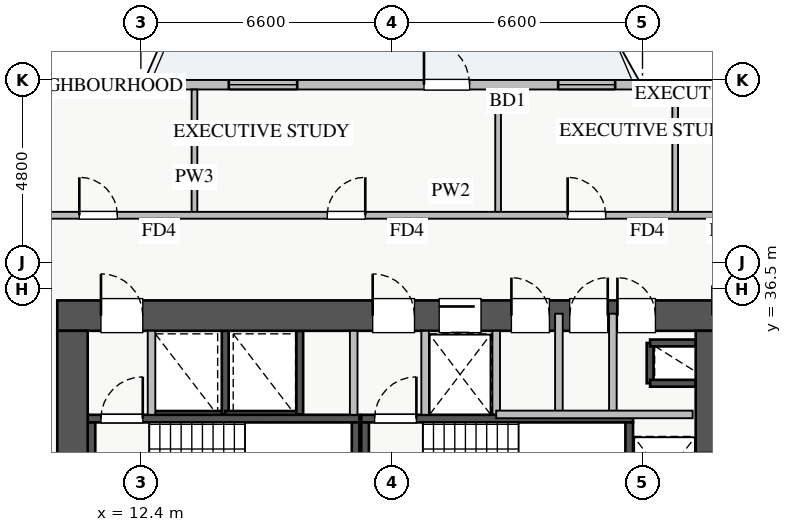
"""IFC4 building model, lengths in metres.
Left out: names, types, materials, properties, quantities, classifications, styles, units other than length and angle.
Written with IfcOpenShell. Run it as: python <this file> out.ifc"""

import sys

from ifc_helpers import new_model, si_unit, direction, frame, frame_2d, origin, place, context, subcontext, project, spatial, rectangle, extrude, source, transform, mapped, element, fill, save


model = new_model("IFC4")
c1 = context("Model", 3, precision=1e-05, world=origin(), true_north=direction((0.0, 1.0)))
c2 = subcontext(c1, "Body", "Model", "MODEL_VIEW")
j1 = project(units=[si_unit("LENGTHUNIT", "METRE"), si_unit("PLANEANGLEUNIT", "RADIAN")], contexts=[c1])
p1 = place(None, origin())
s1 = spatial("IfcSite", under=j1, at=p1, CompositionType="ELEMENT")
p2 = place(p1, origin())
s2 = spatial("IfcBuilding", under=s1, at=p2, CompositionType="ELEMENT")
p3 = place(p2, frame((0.0, 0.0, 63.25)))
s3 = spatial("IfcBuildingStorey", under=s2, at=p3, CompositionType="ELEMENT", Elevation=63.25)
p4 = place(p3, frame((12.68, 33.2, 0.0), z_axis=(0.0, 0.0, 1.0), x_axis=(1.0, 0.0, 0.0)))
e1 = element("IfcWall", 1, at=p4, inside=s3, PredefinedType="SHEAR", context=c2, shape_type="SweptSolid", body=[
    extrude(rectangle(XDim=1.94, YDim=0.18, at=frame_2d((0.97, 0.0))), origin(), (0.0, 0.0, 1.0), 3.07),
])
p5 = place(p3, frame((14.62, 33.2, 0.0), z_axis=(0.0, 0.0, 1.0), x_axis=(0.0, 1.0, 0.0)))
e2 = element("IfcWall", 2, at=p5, inside=s3, PredefinedType="SHEAR", context=c2, shape_type="SweptSolid", body=[
    extrude(rectangle(XDim=2.2, YDim=0.18, at=frame_2d((1.1, 0.0))), origin(), (0.0, 0.0, 1.0), 3.07),
])
p6 = place(p3, frame((25.8, 34.02, 0.0), z_axis=(0.0, 0.0, 1.0), x_axis=(0.0, 1.0, 0.0)))
e3 = element("IfcWall", 3, at=p6, inside=s3, PredefinedType="SHEAR", context=c2, shape_type="SweptSolid", body=[
    extrude(rectangle(XDim=1.06, YDim=0.18, at=frame_2d((0.53, 0.0))), origin(), (0.0, 0.0, 1.0), 3.07),
])
for number, where, z_axis, x_axis in (
    (4, (25.8, 35.08, 0.0), (0.0, 0.0, 1.0), (1.0, 0.0, 0.0)),
    (5, (25.8, 34.02, 0.0), (0.0, 0.0, 1.0), (1.0, 0.0, 0.0)),
):
    element("IfcWall", number, at=place(p3, frame(where, z_axis=z_axis, x_axis=x_axis)), inside=s3, PredefinedType="SHEAR", context=c2, shape_type="SweptSolid", body=[
        extrude(rectangle(XDim=1.2, YDim=0.18, at=frame_2d((0.6, 0.0))), origin(), (0.0, 0.0, 1.0), 3.07),
    ])
p7 = place(p3, frame((14.62, 33.2, 0.0), z_axis=(0.0, 0.0, 1.0), x_axis=(1.0, 0.0, 0.0)))
e6 = element("IfcWall", 6, at=p7, inside=s3, PredefinedType="SHEAR", context=c2, shape_type="SweptSolid", body=[
    extrude(rectangle(XDim=1.96, YDim=0.18, at=frame_2d((0.98, 0.0))), origin(), (0.0, 0.0, 1.0), 3.07),
])
p8 = place(p3, frame((16.58, 33.2, 0.0), z_axis=(0.0, 0.0, 1.0), x_axis=(0.0, 1.0, 0.0)))
e7 = element("IfcWall", 7, at=p8, inside=s3, PredefinedType="SHEAR", context=c2, shape_type="SweptSolid", body=[
    extrude(rectangle(XDim=2.2, YDim=0.18, at=frame_2d((1.1, 0.0))), origin(), (0.0, 0.0, 1.0), 3.07),
])
p9 = place(p3, frame((19.88, 33.2, 0.0), z_axis=(0.0, 0.0, 1.0), x_axis=(1.0, 0.0, 0.0)))
e8 = element("IfcWall", 8, at=p9, inside=s3, PredefinedType="SHEAR", context=c2, shape_type="SweptSolid", body=[
    extrude(rectangle(XDim=1.87, YDim=0.18, at=frame_2d((0.935, 0.0))), origin(), (0.0, 0.0, 1.0), 3.07),
])
p10 = place(p3, frame((11.0, 33.09, 0.0), z_axis=(0.0, 0.0, 1.0), x_axis=(1.0, 0.0, 0.0)))
e9 = element("IfcWall", 9, at=p10, inside=s3, PredefinedType="SHEAR", context=c2, shape_type="SweptSolid", body=[
    extrude(rectangle(XDim=7.15, YDim=0.2, at=frame_2d((3.575, 0.0))), origin(), (0.0, 0.0, 1.0), 3.25),
])
p11 = place(p10, frame((0.35, 0.0, 0.0)))
e10 = element("IfcOpeningElement", 10, at=p11, cuts=e9, PredefinedType="OPENING", context=c2, shape_type="SweptSolid", body=[
    extrude(rectangle(XDim=1.1, YDim=2.05, at=frame_2d((0.55, 1.025))), frame((0.0, 0.11, 0.0), z_axis=(0.0, -1.0, 0.0), x_axis=(1.0, 0.0, 0.0)), (0.0, 0.0, 1.0), 0.22),
])
for number, where, z_axis, x_axis in (
    (11, (11.1, 30.05, 0.0), (0.0, 0.0, 1.0), (0.0, 1.0, 0.0)),
    (12, (18.05, 30.05, 0.0), (0.0, 0.0, 1.0), (0.0, 1.0, 0.0)),
):
    element("IfcWall", number, at=place(p3, frame(where, z_axis=z_axis, x_axis=x_axis)), inside=s3, PredefinedType="SHEAR", context=c2, shape_type="SweptSolid", body=[
        extrude(rectangle(XDim=2.94, YDim=0.2, at=frame_2d((1.47, 0.0))), origin(), (0.0, 0.0, 1.0), 3.25),
    ])
p12 = place(p3, frame((18.2, 33.09, 0.0), z_axis=(0.0, 0.0, 1.0), x_axis=(1.0, 0.0, 0.0)))
e13 = element("IfcWall", 13, at=p12, inside=s3, PredefinedType="SHEAR", context=c2, shape_type="SweptSolid", body=[
    extrude(rectangle(XDim=7.15, YDim=0.2, at=frame_2d((3.575, 0.0))), origin(), (0.0, 0.0, 1.0), 3.25),
])
p13 = place(p12, frame((0.35, 0.0, 0.0)))
e14 = element("IfcOpeningElement", 14, at=p13, cuts=e13, PredefinedType="OPENING", context=c2, shape_type="SweptSolid", body=[
    extrude(rectangle(XDim=1.1, YDim=2.05, at=frame_2d((0.55, 1.025))), frame((0.0, 0.11, 0.0), z_axis=(0.0, -1.0, 0.0), x_axis=(1.0, 0.0, 0.0)), (0.0, 0.0, 1.0), 0.22),
])
for number, where, z_axis, x_axis in (
    (15, (18.3, 30.05, 0.0), (0.0, 0.0, 1.0), (0.0, 1.0, 0.0)),
    (16, (25.25, 30.05, 0.0), (0.0, 0.0, 1.0), (0.0, 1.0, 0.0)),
):
    element("IfcWall", number, at=place(p3, frame(where, z_axis=z_axis, x_axis=x_axis)), inside=s3, PredefinedType="SHEAR", context=c2, shape_type="SweptSolid", body=[
        extrude(rectangle(XDim=2.94, YDim=0.2, at=frame_2d((1.47, 0.0))), origin(), (0.0, 0.0, 1.0), 3.25),
    ])
p14 = place(p3, frame((10.2, 35.8, 0.0), z_axis=(0.0, 0.0, 1.0), x_axis=(1.0, 0.0, 0.0)))
e17 = element("IfcWall", 17, at=p14, inside=s3, PredefinedType="SHEAR", context=c2, shape_type="SweptSolid", body=[
    extrude(rectangle(XDim=17.6, YDim=0.8, at=frame_2d((8.8, 0.0))), origin(), (0.0, 0.0, 1.0), 3.25),
])
p15 = place(p14, frame((1.15, 0.0, 0.0)))
e18 = element("IfcOpeningElement", 18, at=p15, cuts=e17, PredefinedType="OPENING", context=c2, shape_type="SweptSolid", body=[
    extrude(rectangle(XDim=1.1, YDim=2.05, at=frame_2d((0.55, 1.025))), frame((0.0, 0.41, 0.0), z_axis=(0.0, -1.0, 0.0), x_axis=(1.0, 0.0, 0.0)), (0.0, 0.0, 1.0), 0.82),
])
p16 = place(p14, frame((8.3, 0.0, 0.0)))
e19 = element("IfcOpeningElement", 19, at=p16, cuts=e17, PredefinedType="OPENING", context=c2, shape_type="SweptSolid", body=[
    extrude(rectangle(XDim=1.1, YDim=2.05, at=frame_2d((0.55, 1.025))), frame((0.0, 0.41, 0.0), z_axis=(0.0, -1.0, 0.0), x_axis=(1.0, 0.0, 0.0)), (0.0, 0.0, 1.0), 0.82),
])
p17 = place(p14, frame((10.05, 0.0, 0.0)))
e20 = element("IfcOpeningElement", 20, at=p17, cuts=e17, PredefinedType="OPENING", context=c2, shape_type="SweptSolid", body=[
    extrude(rectangle(XDim=1.1, YDim=2.05, at=frame_2d((0.55, 1.025))), frame((0.0, 0.41, 0.0), z_axis=(0.0, -1.0, 0.0), x_axis=(1.0, 0.0, 0.0)), (0.0, 0.0, 1.0), 0.82),
])
p18 = place(p14, frame((14.74, 0.0, 0.0)))
e21 = element("IfcOpeningElement", 21, at=p18, cuts=e17, PredefinedType="OPENING", context=c2, shape_type="SweptSolid", body=[
    extrude(rectangle(XDim=1.0, YDim=2.05, at=frame_2d((0.5, 1.025))), frame((0.0, 0.41, 0.0), z_axis=(0.0, -1.0, 0.0), x_axis=(1.0, 0.0, 0.0)), (0.0, 0.0, 1.0), 0.82),
])
p19 = place(p14, frame((11.95, 0.0, 0.0)))
e22 = element("IfcOpeningElement", 22, at=p19, cuts=e17, PredefinedType="OPENING", context=c2, shape_type="SweptSolid", body=[
    extrude(rectangle(XDim=1.0, YDim=2.05, at=frame_2d((0.5, 1.025))), frame((0.0, 0.41, 0.0), z_axis=(0.0, -1.0, 0.0), x_axis=(1.0, 0.0, 0.0)), (0.0, 0.0, 1.0), 0.82),
])
p20 = place(p14, frame((13.485, 0.0, 0.0)))
e23 = element("IfcOpeningElement", 23, at=p20, cuts=e17, PredefinedType="OPENING", context=c2, shape_type="SweptSolid", body=[
    extrude(rectangle(XDim=1.0, YDim=2.05, at=frame_2d((0.5, 1.025))), frame((0.0, 0.41, 0.0), z_axis=(0.0, -1.0, 0.0), x_axis=(1.0, 0.0, 0.0)), (0.0, 0.0, 1.0), 0.82),
])
p21 = place(p3, frame((10.6, 29.8, 0.0), z_axis=(0.0, 0.0, 1.0), x_axis=(0.0, 1.0, 0.0)))
e24 = element("IfcWall", 24, at=p21, inside=s3, PredefinedType="SHEAR", context=c2, shape_type="SweptSolid", body=[
    extrude(rectangle(XDim=5.6, YDim=0.8, at=frame_2d((2.8, 0.0))), origin(), (0.0, 0.0, 1.0), 3.25),
])
p22 = place(p3, frame((27.4, 29.8, 0.0), z_axis=(0.0, 0.0, 1.0), x_axis=(0.0, 1.0, 0.0)))
e25 = element("IfcWall", 25, at=p22, inside=s3, PredefinedType="SHEAR", context=c2, shape_type="SweptSolid", body=[
    extrude(rectangle(XDim=5.6, YDim=0.8, at=frame_2d((2.8, 0.0))), origin(), (0.0, 0.0, 1.0), 3.25),
])
p23 = place(p22, frame((1.1, 0.0, 0.0)))
e26 = element("IfcOpeningElement", 26, at=p23, cuts=e25, PredefinedType="OPENING", context=c2, shape_type="SweptSolid", body=[
    extrude(rectangle(XDim=1.3, YDim=2.05, at=frame_2d((0.65, 1.025))), frame((0.0, 0.41, 0.0), z_axis=(0.0, -1.0, 0.0), x_axis=(1.0, 0.0, 0.0)), (0.0, 0.0, 1.0), 0.82),
])
p24 = place(p3, frame((5.45, 41.875, 0.0), z_axis=(0.0, 0.0, 1.0), x_axis=(1.0, 0.0, 0.0)))
e27 = element("IfcWall", 27, at=p24, inside=s3, PredefinedType="STANDARD", context=c2, shape_type="SweptSolid", body=[
    extrude(rectangle(XDim=27.1, YDim=0.25, at=frame_2d((13.55, 0.0))), origin(), (0.0, 0.0, 1.0), 2.61),
])
p25 = place(p24, frame((14.4, 0.0, 0.0)))
e28 = element("IfcOpeningElement", 28, at=p25, cuts=e27, PredefinedType="OPENING", context=c2, shape_type="SweptSolid", body=[
    extrude(rectangle(XDim=1.2, YDim=2.1, at=frame_2d((0.6, 1.05))), frame((0.0, 0.135, 0.0), z_axis=(0.0, -1.0, 0.0), x_axis=(1.0, 0.0, 0.0)), (0.0, 0.0, 1.0), 0.27),
])
p26 = place(p24, frame((1.465, 0.0, 0.9)))
e29 = element("IfcOpeningElement", 29, at=p26, cuts=e27, PredefinedType="OPENING", context=c2, shape_type="SweptSolid", body=[
    extrude(rectangle(XDim=1.5, YDim=1.5, at=frame_2d((0.75, 0.75))), frame((0.0, 0.135, 0.0), z_axis=(0.0, -1.0, 0.0), x_axis=(1.0, 0.0, 0.0)), (0.0, 0.0, 1.0), 0.27),
])
p27 = place(p24, frame((9.263, 0.0, 0.9)))
e30 = element("IfcOpeningElement", 30, at=p27, cuts=e27, PredefinedType="OPENING", context=c2, shape_type="SweptSolid", body=[
    extrude(rectangle(XDim=1.8, YDim=1.45, at=frame_2d((0.9, 0.725))), frame((0.0, 0.135, 0.0), z_axis=(0.0, -1.0, 0.0), x_axis=(1.0, 0.0, 0.0)), (0.0, 0.0, 1.0), 0.27),
])
p28 = place(p24, frame((17.93, 0.0, 0.9)))
e31 = element("IfcOpeningElement", 31, at=p28, cuts=e27, PredefinedType="OPENING", context=c2, shape_type="SweptSolid", body=[
    extrude(rectangle(XDim=1.5, YDim=1.5, at=frame_2d((0.75, 0.75))), frame((0.0, 0.135, 0.0), z_axis=(0.0, -1.0, 0.0), x_axis=(1.0, 0.0, 0.0)), (0.0, 0.0, 1.0), 0.27),
])
p29 = place(p24, frame((22.663, 0.0, 0.9)))
e32 = element("IfcOpeningElement", 32, at=p29, cuts=e27, PredefinedType="OPENING", context=c2, shape_type="SweptSolid", body=[
    extrude(rectangle(XDim=2.1, YDim=1.48, at=frame_2d((1.05, 0.74))), frame((0.0, 0.135, 0.0), z_axis=(0.0, -1.0, 0.0), x_axis=(1.0, 0.0, 0.0)), (0.0, 0.0, 1.0), 0.27),
])
p30 = place(p24, frame((4.63, 0.0, 0.9)))
e33 = element("IfcOpeningElement", 33, at=p30, cuts=e27, PredefinedType="OPENING", context=c2, shape_type="SweptSolid", body=[
    extrude(rectangle(XDim=2.4, YDim=1.5, at=frame_2d((1.2, 0.75))), frame((0.0, 0.135, 0.0), z_axis=(0.0, -1.0, 0.0), x_axis=(1.0, 0.0, 0.0)), (0.0, 0.0, 1.0), 0.27),
])
for number, where, z_axis, x_axis in (
    (34, (12.68, 33.19, 0.0), (0.0, 0.0, 1.0), (0.0, 1.0, 0.0)),
    (35, (18.0, 33.19, 0.0), (0.0, 0.0, 1.0), (0.0, 1.0, 0.0)),
    (36, (19.88, 33.19, 0.0), (0.0, 0.0, 1.0), (0.0, 1.0, 0.0)),
):
    element("IfcWall", number, at=place(p3, frame(where, z_axis=z_axis, x_axis=x_axis)), inside=s3, PredefinedType="PARTITIONING", context=c2, shape_type="SweptSolid", body=[
        extrude(rectangle(XDim=2.21, YDim=0.2, at=frame_2d((1.105, 0.0))), origin(), (0.0, 0.0, 1.0), 3.07),
    ])
p31 = place(p3, frame((24.82, 33.2, 0.0), z_axis=(0.0, 0.0, 1.0), x_axis=(0.0, 1.0, 0.0)))
e37 = element("IfcWall", 37, at=p31, inside=s3, PredefinedType="PARTITIONING", context=c2, shape_type="SweptSolid", body=[
    extrude(rectangle(XDim=2.65, YDim=0.2, at=frame_2d((1.325, 0.0))), origin(), (0.0, 0.0, 1.0), 3.07),
])
p32 = place(p3, frame((21.75, 33.2, 0.0), z_axis=(0.0, 0.0, 1.0), x_axis=(0.0, 1.0, 0.0)))
e38 = element("IfcWall", 38, at=p32, inside=s3, PredefinedType="PARTITIONING", context=c2, shape_type="SweptSolid", body=[
    extrude(rectangle(XDim=2.2, YDim=0.2, at=frame_2d((1.1, 0.0))), origin(), (0.0, 0.0, 1.0), 3.07),
])
p33 = place(p3, frame((23.4, 33.2, 0.0), z_axis=(0.0, 0.0, 1.0), x_axis=(0.0, 1.0, 0.0)))
e39 = element("IfcWall", 39, at=p33, inside=s3, PredefinedType="PARTITIONING", context=c2, shape_type="SweptSolid", body=[
    extrude(rectangle(XDim=2.65, YDim=0.2, at=frame_2d((1.325, 0.0))), origin(), (0.0, 0.0, 1.0), 3.07),
])
p34 = place(p3, frame((21.75, 33.2, 0.0), z_axis=(0.0, 0.0, 1.0), x_axis=(1.0, 0.0, 0.0)))
e40 = element("IfcWall", 40, at=p34, inside=s3, PredefinedType="PARTITIONING", context=c2, shape_type="SweptSolid", body=[
    extrude(rectangle(XDim=5.17, YDim=0.2, at=frame_2d((2.585, 0.0))), origin(), (0.0, 0.0, 1.0), 3.07),
])
for number, where, z_axis, x_axis in (
    (41, (13.81, 38.44, 0.0), (0.0, 0.0, 1.0), (0.0, 1.0, 0.0)),
    (42, (21.8, 38.44, 0.0), (0.0, 0.0, 1.0), (0.0, 1.0, 0.0)),
    (43, (26.46, 38.44, 0.0), (0.0, 0.0, 1.0), (0.0, 1.0, 0.0)),
):
    element("IfcWall", number, at=place(p3, frame(where, z_axis=z_axis, x_axis=x_axis)), inside=s3, PredefinedType="PARTITIONING", context=c2, shape_type="SweptSolid", body=[
        extrude(rectangle(XDim=3.31, YDim=0.15, at=frame_2d((1.655, 0.0))), origin(), (0.0, 0.0, 1.0), 3.07),
    ])
p35 = place(p3, frame((8.75, 38.44, 0.0), z_axis=(0.0, 0.0, 1.0), x_axis=(1.0, 0.0, 0.0)))
e44 = element("IfcWall", 44, at=p35, inside=s3, PredefinedType="PARTITIONING", context=c2, shape_type="SweptSolid", body=[
    extrude(rectangle(XDim=23.61, YDim=0.18, at=frame_2d((11.805, 0.0))), origin(), (0.0, 0.0, 1.0), 3.07),
])
p36 = place(p35, frame((2.03, 0.0, 0.0)))
e45 = element("IfcOpeningElement", 45, at=p36, cuts=e44, PredefinedType="OPENING", context=c2, shape_type="SweptSolid", body=[
    extrude(rectangle(XDim=1.0, YDim=2.05, at=frame_2d((0.5, 1.025))), frame((0.0, 0.1, 0.0), z_axis=(0.0, -1.0, 0.0), x_axis=(1.0, 0.0, 0.0)), (0.0, 0.0, 1.0), 0.2),
])
p37 = place(p35, frame((8.555, 0.0, 0.0)))
e46 = element("IfcOpeningElement", 46, at=p37, cuts=e44, PredefinedType="OPENING", context=c2, shape_type="SweptSolid", body=[
    extrude(rectangle(XDim=1.0, YDim=2.05, at=frame_2d((0.5, 1.025))), frame((0.0, 0.1, 0.0), z_axis=(0.0, -1.0, 0.0), x_axis=(1.0, 0.0, 0.0)), (0.0, 0.0, 1.0), 0.2),
])
p38 = place(p35, frame((14.88, 0.0, 0.0)))
e47 = element("IfcOpeningElement", 47, at=p38, cuts=e44, PredefinedType="OPENING", context=c2, shape_type="SweptSolid", body=[
    extrude(rectangle(XDim=1.0, YDim=2.05, at=frame_2d((0.5, 1.025))), frame((0.0, 0.1, 0.0), z_axis=(0.0, -1.0, 0.0), x_axis=(1.0, 0.0, 0.0)), (0.0, 0.0, 1.0), 0.2),
])
p39 = place(p35, frame((20.16, 0.0, 0.0)))
e48 = element("IfcOpeningElement", 48, at=p39, cuts=e44, PredefinedType="OPENING", context=c2, shape_type="SweptSolid", body=[
    extrude(rectangle(XDim=1.0, YDim=2.05, at=frame_2d((0.5, 1.025))), frame((0.0, 0.1, 0.0), z_axis=(0.0, -1.0, 0.0), x_axis=(1.0, 0.0, 0.0)), (0.0, 0.0, 1.0), 0.2),
])
m1 = source(origin(), c2, "Body", "SweptSolid", [
    extrude(rectangle(XDim=1.2, YDim=2.1, at=frame_2d((0.6, 1.05))), frame((0.0, 0.025, 0.0), z_axis=(0.0, -1.0, 0.0), x_axis=(1.0, 0.0, 0.0)), (0.0, 0.0, 1.0), 0.05),
])
p40 = place(p25, origin())
e49 = element("IfcDoor", 49, at=p40, inside=s3, OperationType="SINGLE_SWING_LEFT", PredefinedType="DOOR", context=c2, shape_type="MappedRepresentation", body=[
    mapped(m1, transform((0.0, 0.0, 0.0), x_axis=(1.0, 0.0, 0.0), y_axis=(0.0, 1.0, 0.0), z_axis=(0.0, 0.0, 1.0), scale=1.0)),
])
fill(e28, e49)
m2 = source(origin(), c2, "Body", "SweptSolid", [
    extrude(rectangle(XDim=1.8, YDim=1.45, at=frame_2d((0.9, 0.725))), frame((0.0, 0.03, 0.0), z_axis=(0.0, -1.0, 0.0), x_axis=(1.0, 0.0, 0.0)), (0.0, 0.0, 1.0), 0.06),
])
p41 = place(p27, origin())
e50 = element("IfcWindow", 50, at=p41, inside=s3, PartitioningType="DOUBLE_PANEL_VERTICAL", PredefinedType="WINDOW", context=c2, shape_type="MappedRepresentation", body=[
    mapped(m2, transform((0.0, 0.0, 0.0), x_axis=(1.0, 0.0, 0.0), y_axis=(0.0, 1.0, 0.0), z_axis=(0.0, 0.0, 1.0), scale=1.0)),
])
fill(e30, e50)
m3 = source(origin(), c2, "Body", "SweptSolid", [
    extrude(rectangle(XDim=1.5, YDim=1.5, at=frame_2d((0.75, 0.75))), frame((0.0, 0.03, 0.0), z_axis=(0.0, -1.0, 0.0), x_axis=(1.0, 0.0, 0.0)), (0.0, 0.0, 1.0), 0.06),
])
p42 = place(p28, origin())
e51 = element("IfcWindow", 51, at=p42, inside=s3, PartitioningType="DOUBLE_PANEL_VERTICAL", PredefinedType="WINDOW", context=c2, shape_type="MappedRepresentation", body=[
    mapped(m3, transform((0.0, 0.0, 0.0), x_axis=(1.0, 0.0, 0.0), y_axis=(0.0, 1.0, 0.0), z_axis=(0.0, 0.0, 1.0), scale=1.0)),
])
fill(e31, e51)
m4 = source(origin(), c2, "Body", "SweptSolid", [
    extrude(rectangle(XDim=1.3, YDim=2.05, at=frame_2d((0.65, 1.025))), frame((0.0, 0.025, 0.0), z_axis=(0.0, -1.0, 0.0), x_axis=(1.0, 0.0, 0.0)), (0.0, 0.0, 1.0), 0.05),
])
p43 = place(p23, origin())
e52 = element("IfcDoor", 52, at=p43, inside=s3, OperationType="SLIDING_TO_LEFT", PredefinedType="DOOR", context=c2, shape_type="MappedRepresentation", body=[
    mapped(m4, transform((0.0, 0.0, 0.0), x_axis=(1.0, 0.0, 0.0), y_axis=(0.0, 1.0, 0.0), z_axis=(0.0, 0.0, 1.0), scale=1.0)),
])
fill(e26, e52)
m5 = source(origin(), c2, "Body", "SweptSolid", [
    extrude(rectangle(XDim=1.1, YDim=2.05, at=frame_2d((0.55, 1.025))), frame((0.0, 0.025, 0.0), z_axis=(0.0, -1.0, 0.0), x_axis=(1.0, 0.0, 0.0)), (0.0, 0.0, 1.0), 0.05),
])
p44 = place(p15, origin())
e53 = element("IfcDoor", 53, at=p44, inside=s3, OperationType="SINGLE_SWING_LEFT", PredefinedType="DOOR", context=c2, shape_type="MappedRepresentation", body=[
    mapped(m5, transform((0.0, 0.0, 0.0), x_axis=(1.0, 0.0, 0.0), y_axis=(0.0, 1.0, 0.0), z_axis=(0.0, 0.0, 1.0), scale=1.0)),
])
fill(e18, e53)
p45 = place(p11, origin())
e54 = element("IfcDoor", 54, at=p45, inside=s3, OperationType="SINGLE_SWING_RIGHT", PredefinedType="DOOR", context=c2, shape_type="MappedRepresentation", body=[
    mapped(m5, transform((0.0, 0.0, 0.0), x_axis=(1.0, 0.0, 0.0), y_axis=(0.0, 1.0, 0.0), z_axis=(0.0, 0.0, 1.0), scale=1.0)),
])
fill(e10, e54)
p46 = place(p16, origin())
e55 = element("IfcDoor", 55, at=p46, inside=s3, OperationType="SINGLE_SWING_LEFT", PredefinedType="DOOR", context=c2, shape_type="MappedRepresentation", body=[
    mapped(m5, transform((0.0, 0.0, 0.0), x_axis=(1.0, 0.0, 0.0), y_axis=(0.0, 1.0, 0.0), z_axis=(0.0, 0.0, 1.0), scale=1.0)),
])
fill(e19, e55)
p47 = place(p13, origin())
e56 = element("IfcDoor", 56, at=p47, inside=s3, OperationType="SINGLE_SWING_RIGHT", PredefinedType="DOOR", context=c2, shape_type="MappedRepresentation", body=[
    mapped(m5, transform((0.0, 0.0, 0.0), x_axis=(1.0, 0.0, 0.0), y_axis=(0.0, 1.0, 0.0), z_axis=(0.0, 0.0, 1.0), scale=1.0)),
])
fill(e14, e56)
p48 = place(p17, origin())
e57 = element("IfcDoor", 57, at=p48, inside=s3, OperationType="SLIDING_TO_LEFT", PredefinedType="DOOR", context=c2, shape_type="MappedRepresentation", body=[
    mapped(m5, transform((0.0, 0.0, 0.0), x_axis=(1.0, 0.0, 0.0), y_axis=(0.0, 1.0, 0.0), z_axis=(0.0, 0.0, 1.0), scale=1.0)),
])
fill(e20, e57)
m6 = source(origin(), c2, "Body", "SweptSolid", [
    extrude(rectangle(XDim=1.0, YDim=2.05, at=frame_2d((0.5, 1.025))), frame((0.0, 0.025, 0.0), z_axis=(0.0, -1.0, 0.0), x_axis=(1.0, 0.0, 0.0)), (0.0, 0.0, 1.0), 0.05),
])
p49 = place(p18, origin())
e58 = element("IfcDoor", 58, at=p49, inside=s3, OperationType="SINGLE_SWING_LEFT", PredefinedType="DOOR", context=c2, shape_type="MappedRepresentation", body=[
    mapped(m6, transform((0.0, 0.0, 0.0), x_axis=(1.0, 0.0, 0.0), y_axis=(0.0, 1.0, 0.0), z_axis=(0.0, 0.0, 1.0), scale=1.0)),
])
fill(e21, e58)
p50 = place(p19, origin())
e59 = element("IfcDoor", 59, at=p50, inside=s3, OperationType="SINGLE_SWING_LEFT", PredefinedType="DOOR", context=c2, shape_type="MappedRepresentation", body=[
    mapped(m6, transform((0.0, 0.0, 0.0), x_axis=(1.0, 0.0, 0.0), y_axis=(0.0, 1.0, 0.0), z_axis=(0.0, 0.0, 1.0), scale=1.0)),
])
fill(e22, e59)
p51 = place(p20, origin())
e60 = element("IfcDoor", 60, at=p51, inside=s3, OperationType="SINGLE_SWING_RIGHT", PredefinedType="DOOR", context=c2, shape_type="MappedRepresentation", body=[
    mapped(m6, transform((0.0, 0.0, 0.0), x_axis=(1.0, 0.0, 0.0), y_axis=(0.0, 1.0, 0.0), z_axis=(0.0, 0.0, 1.0), scale=1.0)),
])
fill(e23, e60)
p52 = place(p36, origin())
e61 = element("IfcDoor", 61, at=p52, inside=s3, OperationType="SINGLE_SWING_LEFT", PredefinedType="DOOR", context=c2, shape_type="MappedRepresentation", body=[
    mapped(m6, transform((0.0, 0.0, 0.0), x_axis=(1.0, 0.0, 0.0), y_axis=(0.0, 1.0, 0.0), z_axis=(0.0, 0.0, 1.0), scale=1.0)),
])
fill(e45, e61)
p53 = place(p37, origin())
e62 = element("IfcDoor", 62, at=p53, inside=s3, OperationType="SINGLE_SWING_RIGHT", PredefinedType="DOOR", context=c2, shape_type="MappedRepresentation", body=[
    mapped(m6, transform((0.0, 0.0, 0.0), x_axis=(1.0, 0.0, 0.0), y_axis=(0.0, 1.0, 0.0), z_axis=(0.0, 0.0, 1.0), scale=1.0)),
])
fill(e46, e62)
p54 = place(p38, origin())
e63 = element("IfcDoor", 63, at=p54, inside=s3, OperationType="SINGLE_SWING_LEFT", PredefinedType="DOOR", context=c2, shape_type="MappedRepresentation", body=[
    mapped(m6, transform((0.0, 0.0, 0.0), x_axis=(1.0, 0.0, 0.0), y_axis=(0.0, 1.0, 0.0), z_axis=(0.0, 0.0, 1.0), scale=1.0)),
])
fill(e47, e63)
m7 = source(origin(), c2, "Body", "SweptSolid", [
    extrude(rectangle(XDim=2.4, YDim=1.5, at=frame_2d((1.2, 0.75))), frame((0.0, 0.03, 0.0), z_axis=(0.0, -1.0, 0.0), x_axis=(1.0, 0.0, 0.0)), (0.0, 0.0, 1.0), 0.06),
])
p55 = place(p30, origin())
e64 = element("IfcWindow", 64, at=p55, inside=s3, PartitioningType="TRIPLE_PANEL_VERTICAL", PredefinedType="WINDOW", context=c2, shape_type="MappedRepresentation", body=[
    mapped(m7, transform((0.0, 0.0, 0.0), x_axis=(1.0, 0.0, 0.0), y_axis=(0.0, 1.0, 0.0), z_axis=(0.0, 0.0, 1.0), scale=1.0)),
])
fill(e33, e64)
save(model, sys.argv[1])
